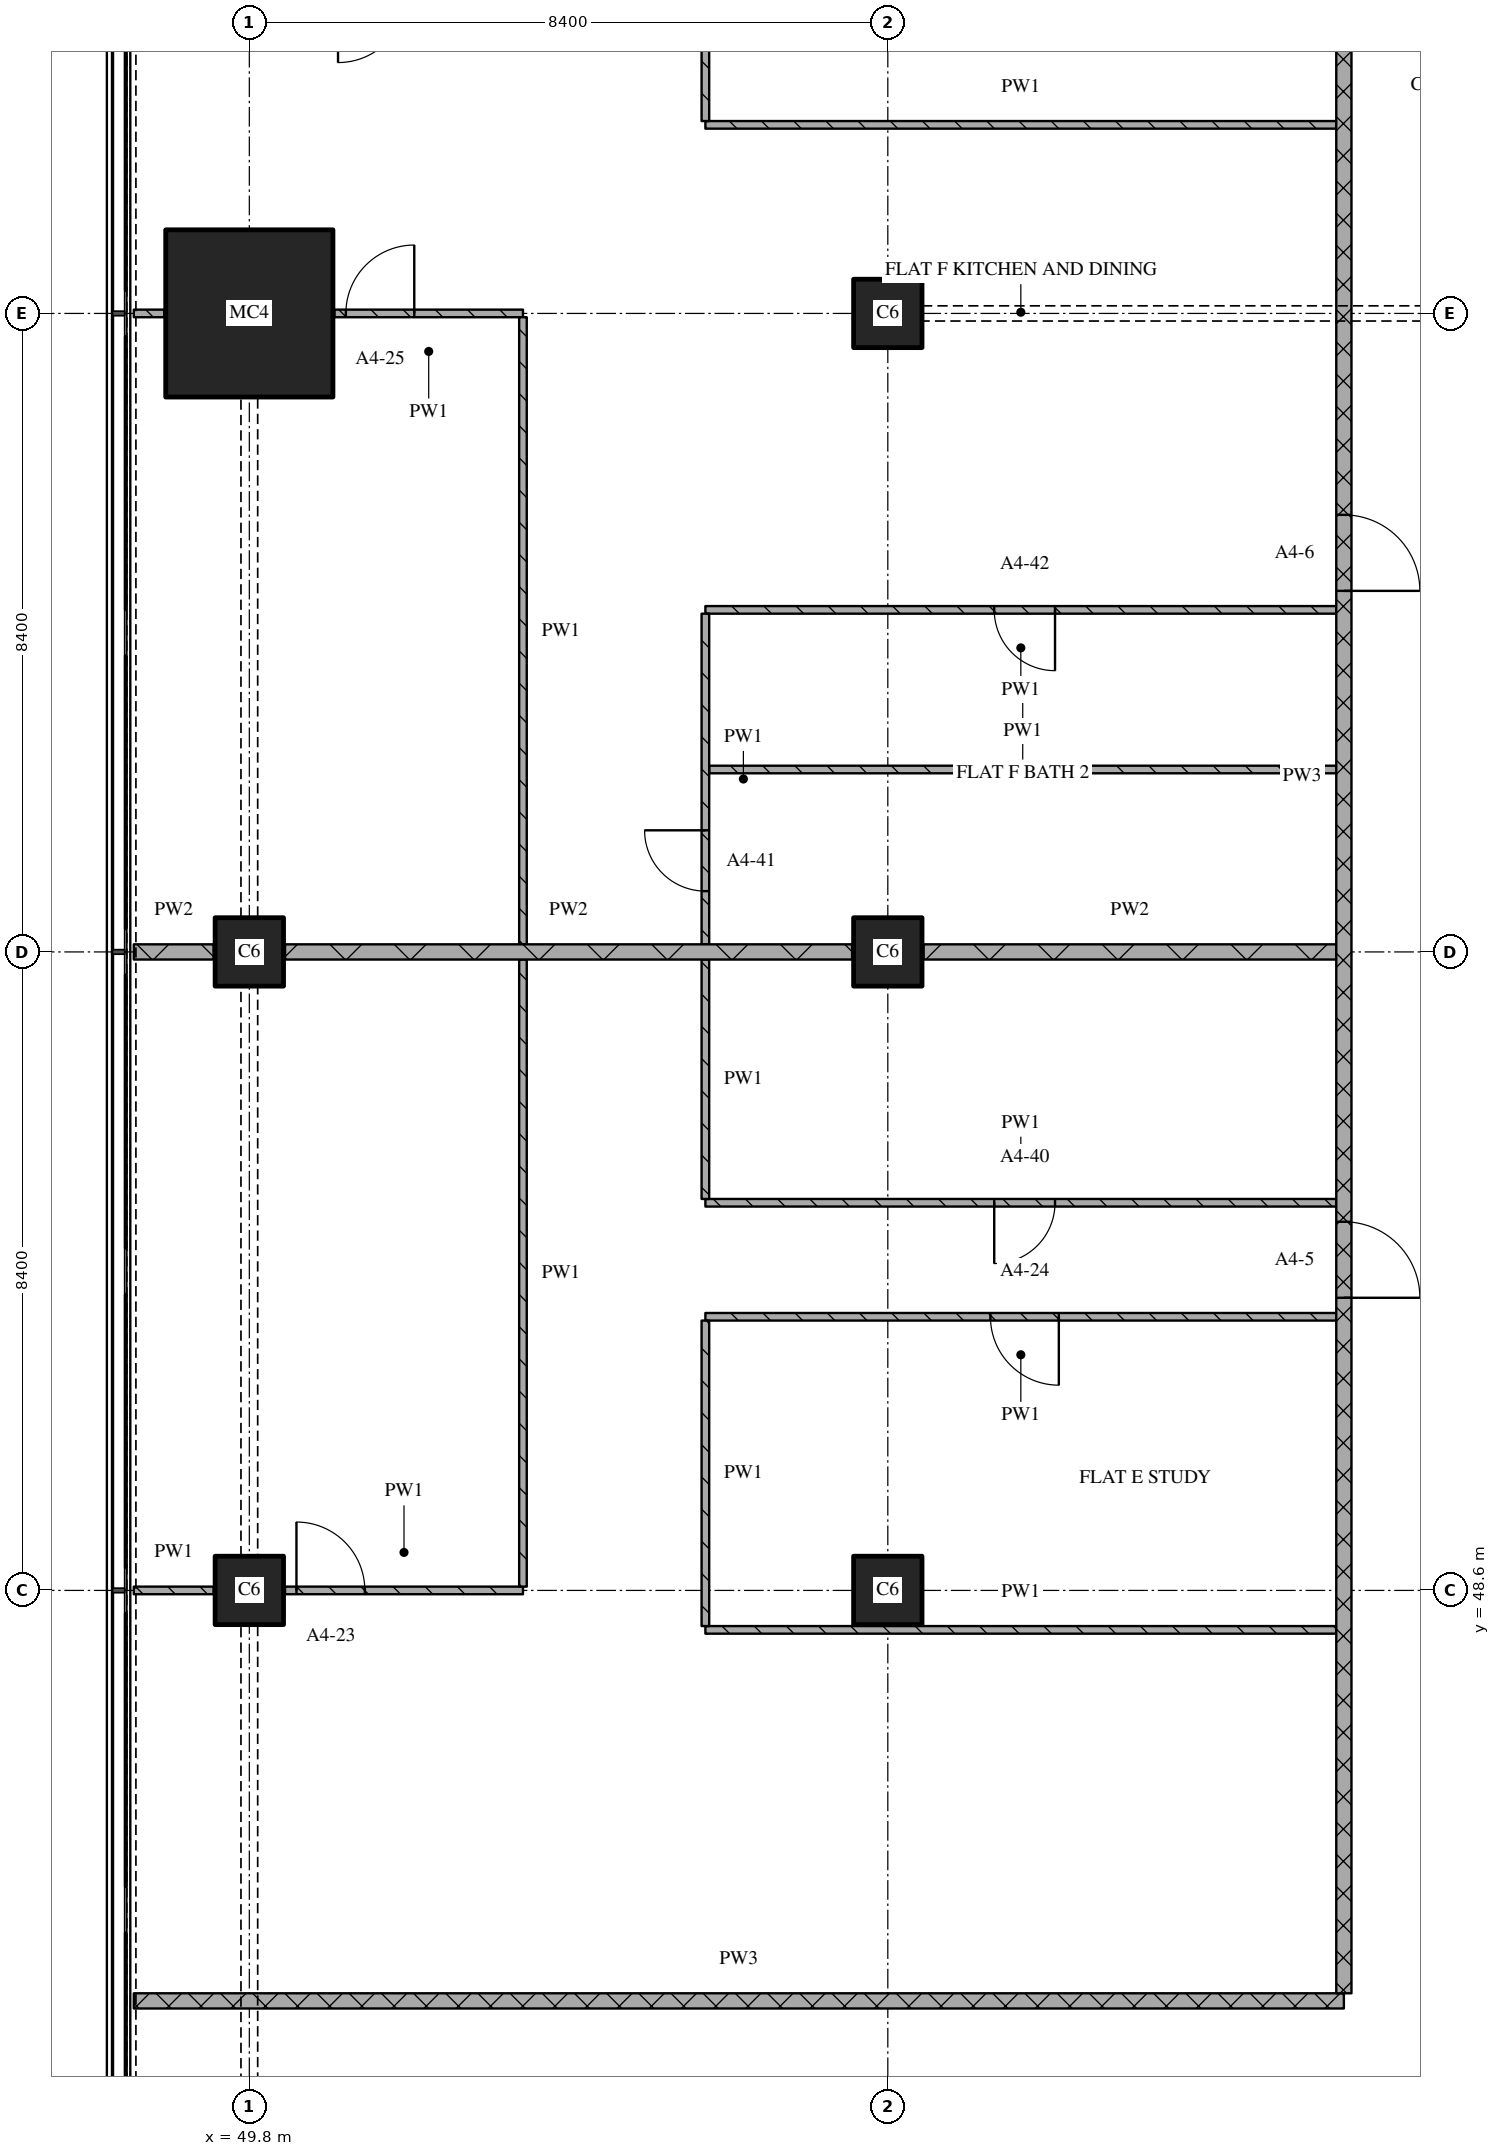
"""IFC4 building model, lengths in metres.
Left out: names, types, materials, properties, quantities, classifications, styles, units other than length and angle.
Written with IfcOpenShell. Run it as: python <this file> out.ifc"""

import sys

from ifc_helpers import new_model, si_unit, direction, frame, frame_2d, origin, origin_2d, place, context, subcontext, project, spatial, rectangle, extrude, element, fill, save


model = new_model("IFC4")
c1 = context("Model", 3, precision=1e-05, world=origin(), true_north=direction((0.0, 1.0)))
c2 = subcontext(c1, "Body", "Model", "MODEL_VIEW")
j1 = project(units=[si_unit("LENGTHUNIT", "METRE"), si_unit("PLANEANGLEUNIT", "RADIAN")], contexts=[c1])
p1 = place(None, origin())
s1 = spatial("IfcSite", under=j1, at=p1, CompositionType="ELEMENT")
p2 = place(p1, origin())
s2 = spatial("IfcBuilding", under=s1, at=p2, CompositionType="ELEMENT")
p3 = place(p2, frame((0.0, 0.0, 69.6)))
s3 = spatial("IfcBuildingStorey", under=s2, at=p3, CompositionType="ELEMENT", Elevation=69.6)
for number, where, z_axis, x_axis in (
    (1, (49.8, 48.6, 0.0), (0.0, 0.0, 1.0), (1.0, 0.0, 0.0)),
    (2, (49.8, 57.0, 0.0), (0.0, 0.0, 1.0), (1.0, 0.0, 0.0)),
):
    element("IfcColumn", number, at=place(p3, frame(where, z_axis=z_axis, x_axis=x_axis)), inside=s3, PredefinedType="COLUMN", context=c2, shape_type="SweptSolid", body=[
        extrude(rectangle(XDim=0.9, YDim=0.9, at=origin_2d()), origin(), (0.0, 0.0, 1.0), 3.6),
    ])
p4 = place(p3, frame((49.8, 65.4, 0.0), z_axis=(0.0, 0.0, 1.0), x_axis=(1.0, 0.0, 0.0)))
e3 = element("IfcColumn", 3, at=p4, inside=s3, PredefinedType="COLUMN", context=c2, shape_type="SweptSolid", body=[
    extrude(rectangle(XDim=2.2, YDim=2.2, at=origin_2d()), origin(), (0.0, 0.0, 1.0), 3.6),
])
for number, where, z_axis, x_axis in (
    (4, (58.2, 48.6, 0.0), (0.0, 0.0, 1.0), (1.0, 0.0, 0.0)),
    (5, (58.2, 57.0, 0.0), (0.0, 0.0, 1.0), (1.0, 0.0, 0.0)),
    (6, (58.2, 65.4, 0.0), (0.0, 0.0, 1.0), (1.0, 0.0, 0.0)),
):
    element("IfcColumn", number, at=place(p3, frame(where, z_axis=z_axis, x_axis=x_axis)), inside=s3, PredefinedType="COLUMN", context=c2, shape_type="SweptSolid", body=[
        extrude(rectangle(XDim=0.9, YDim=0.9, at=origin_2d()), origin(), (0.0, 0.0, 1.0), 3.6),
    ])
p5 = place(p3, frame((48.28, 43.2, 0.0), z_axis=(0.0, 0.0, 1.0), x_axis=(1.0, 0.0, 0.0)))
e7 = element("IfcWall", 7, at=p5, inside=s3, PredefinedType="PARTITIONING", context=c2, shape_type="SweptSolid", body=[
    extrude(rectangle(XDim=15.92, YDim=0.2, at=frame_2d((7.96, 0.0))), origin(), (0.0, 0.0, 1.0), 3.32),
])
p6 = place(p3, frame((55.8, 48.081, 0.0), z_axis=(0.0, 0.0, 1.0), x_axis=(1.0, 0.0, 0.0)))
e8 = element("IfcWall", 8, at=p6, inside=s3, PredefinedType="PARTITIONING", context=c2, shape_type="SweptSolid", body=[
    extrude(rectangle(XDim=8.3, YDim=0.1, at=frame_2d((4.15, 0.0))), origin(), (0.0, 0.0, 1.0), 3.32),
])
p7 = place(p3, frame((48.28, 48.6, 0.0), z_axis=(0.0, 0.0, 1.0), x_axis=(1.0, 0.0, 0.0)))
e9 = element("IfcWall", 9, at=p7, inside=s3, PredefinedType="PARTITIONING", context=c2, shape_type="SweptSolid", body=[
    extrude(rectangle(XDim=1.05, YDim=0.1, at=frame_2d((0.525, 0.0))), origin(), (0.0, 0.0, 1.0), 3.32),
])
p8 = place(p3, frame((50.27, 48.6, 0.0), z_axis=(0.0, 0.0, 1.0), x_axis=(1.0, 0.0, 0.0)))
e10 = element("IfcWall", 10, at=p8, inside=s3, PredefinedType="PARTITIONING", context=c2, shape_type="SweptSolid", body=[
    extrude(rectangle(XDim=3.13, YDim=0.1, at=frame_2d((1.565, 0.0))), origin(), (0.0, 0.0, 1.0), 3.32),
])
p9 = place(p8, frame((0.15, 0.0, 0.0)))
e11 = element("IfcOpeningElement", 11, at=p9, cuts=e10, PredefinedType="OPENING", context=c2, shape_type="SweptSolid", body=[
    extrude(rectangle(XDim=0.9, YDim=2.1, at=frame_2d((0.45, 1.05))), frame((0.0, 0.06, 0.0), z_axis=(0.0, -1.0, 0.0), x_axis=(1.0, 0.0, 0.0)), (0.0, 0.0, 1.0), 0.12),
])
p10 = place(p3, frame((64.1, 52.2, 0.0), z_axis=(0.0, 0.0, 1.0), x_axis=(-1.0, 0.0, 0.0)))
e12 = element("IfcWall", 12, at=p10, inside=s3, PredefinedType="PARTITIONING", context=c2, shape_type="SweptSolid", body=[
    extrude(rectangle(XDim=8.3, YDim=0.1, at=frame_2d((4.15, 0.0))), origin(), (0.0, 0.0, 1.0), 3.32),
])
p11 = place(p10, frame((3.65, 0.0, 0.0)))
e13 = element("IfcOpeningElement", 13, at=p11, cuts=e12, PredefinedType="OPENING", context=c2, shape_type="SweptSolid", body=[
    extrude(rectangle(XDim=0.9, YDim=2.1, at=frame_2d((0.45, 1.05))), frame((0.0, 0.06, 0.0), z_axis=(0.0, -1.0, 0.0), x_axis=(1.0, 0.0, 0.0)), (0.0, 0.0, 1.0), 0.12),
])
p12 = place(p3, frame((55.8, 53.7, 0.0), z_axis=(0.0, 0.0, 1.0), x_axis=(1.0, 0.0, 0.0)))
e14 = element("IfcWall", 14, at=p12, inside=s3, PredefinedType="PARTITIONING", context=c2, shape_type="SweptSolid", body=[
    extrude(rectangle(XDim=8.3, YDim=0.1, at=frame_2d((4.15, 0.0))), origin(), (0.0, 0.0, 1.0), 3.32),
])
p13 = place(p12, frame((3.8, 0.0, 0.0)))
e15 = element("IfcOpeningElement", 15, at=p13, cuts=e14, PredefinedType="OPENING", context=c2, shape_type="SweptSolid", body=[
    extrude(rectangle(XDim=0.8, YDim=2.1, at=frame_2d((0.4, 1.05))), frame((0.0, 0.06, 0.0), z_axis=(0.0, -1.0, 0.0), x_axis=(1.0, 0.0, 0.0)), (0.0, 0.0, 1.0), 0.12),
])
p14 = place(p3, frame((48.28, 57.0, 0.0), z_axis=(0.0, 0.0, 1.0), x_axis=(1.0, 0.0, 0.0)))
e16 = element("IfcWall", 16, at=p14, inside=s3, PredefinedType="PARTITIONING", context=c2, shape_type="SweptSolid", body=[
    extrude(rectangle(XDim=1.05, YDim=0.2, at=frame_2d((0.525, 0.0))), origin(), (0.0, 0.0, 1.0), 3.32),
])
p15 = place(p3, frame((50.27, 57.0, 0.0), z_axis=(0.0, 0.0, 1.0), x_axis=(1.0, 0.0, 0.0)))
e17 = element("IfcWall", 17, at=p15, inside=s3, PredefinedType="PARTITIONING", context=c2, shape_type="SweptSolid", body=[
    extrude(rectangle(XDim=7.46, YDim=0.2, at=frame_2d((3.73, 0.0))), origin(), (0.0, 0.0, 1.0), 3.32),
])
p16 = place(p3, frame((58.67, 57.0, 0.0), z_axis=(0.0, 0.0, 1.0), x_axis=(1.0, 0.0, 0.0)))
e18 = element("IfcWall", 18, at=p16, inside=s3, PredefinedType="PARTITIONING", context=c2, shape_type="SweptSolid", body=[
    extrude(rectangle(XDim=5.43, YDim=0.2, at=frame_2d((2.715, 0.0))), origin(), (0.0, 0.0, 1.0), 3.32),
])
p17 = place(p3, frame((55.85, 59.4, 0.0), z_axis=(0.0, 0.0, 1.0), x_axis=(1.0, 0.0, 0.0)))
e19 = element("IfcWall", 19, at=p17, inside=s3, PredefinedType="PARTITIONING", context=c2, shape_type="SweptSolid", body=[
    extrude(rectangle(XDim=8.25, YDim=0.1, at=frame_2d((4.125, 0.0))), origin(), (0.0, 0.0, 1.0), 3.32),
])
p18 = place(p3, frame((64.1, 61.5, 0.0), z_axis=(0.0, 0.0, 1.0), x_axis=(-1.0, 0.0, 0.0)))
e20 = element("IfcWall", 20, at=p18, inside=s3, PredefinedType="PARTITIONING", context=c2, shape_type="SweptSolid", body=[
    extrude(rectangle(XDim=8.3, YDim=0.1, at=frame_2d((4.15, 0.0))), origin(), (0.0, 0.0, 1.0), 3.32),
])
p19 = place(p18, frame((3.7, 0.0, 0.0)))
e21 = element("IfcOpeningElement", 21, at=p19, cuts=e20, PredefinedType="OPENING", context=c2, shape_type="SweptSolid", body=[
    extrude(rectangle(XDim=0.8, YDim=2.1, at=frame_2d((0.4, 1.05))), frame((0.0, 0.06, 0.0), z_axis=(0.0, -1.0, 0.0), x_axis=(1.0, 0.0, 0.0)), (0.0, 0.0, 1.0), 0.12),
])
p20 = place(p3, frame((48.28, 65.4, 0.0), z_axis=(0.0, 0.0, 1.0), x_axis=(1.0, 0.0, 0.0)))
e22 = element("IfcWall", 22, at=p20, inside=s3, PredefinedType="PARTITIONING", context=c2, shape_type="SweptSolid", body=[
    extrude(rectangle(XDim=0.4, YDim=0.1, at=frame_2d((0.2, 0.0))), origin(), (0.0, 0.0, 1.0), 3.32),
])
p21 = place(p3, frame((53.4, 65.4, 0.0), z_axis=(0.0, 0.0, 1.0), x_axis=(-1.0, 0.0, 0.0)))
e23 = element("IfcWall", 23, at=p21, inside=s3, PredefinedType="PARTITIONING", context=c2, shape_type="SweptSolid", body=[
    extrude(rectangle(XDim=2.48, YDim=0.1, at=frame_2d((1.24, 0.0))), origin(), (0.0, 0.0, 1.0), 3.32),
])
p22 = place(p21, frame((1.43, 0.0, 0.0)))
e24 = element("IfcOpeningElement", 24, at=p22, cuts=e23, PredefinedType="OPENING", context=c2, shape_type="SweptSolid", body=[
    extrude(rectangle(XDim=0.9, YDim=2.1, at=frame_2d((0.45, 1.05))), frame((0.0, 0.06, 0.0), z_axis=(0.0, -1.0, 0.0), x_axis=(1.0, 0.0, 0.0)), (0.0, 0.0, 1.0), 0.12),
])
p23 = place(p3, frame((55.8, 67.881, 0.0), z_axis=(0.0, 0.0, 1.0), x_axis=(1.0, 0.0, 0.0)))
e25 = element("IfcWall", 25, at=p23, inside=s3, PredefinedType="PARTITIONING", context=c2, shape_type="SweptSolid", body=[
    extrude(rectangle(XDim=8.3, YDim=0.1, at=frame_2d((4.15, 0.0))), origin(), (0.0, 0.0, 1.0), 3.32),
])
p24 = place(p3, frame((55.8, 52.15, 0.0), z_axis=(0.0, 0.0, 1.0), x_axis=(0.0, -1.0, 0.0)))
e26 = element("IfcWall", 26, at=p24, inside=s3, PredefinedType="PARTITIONING", context=c2, shape_type="SweptSolid", body=[
    extrude(rectangle(XDim=4.019, YDim=0.1, at=frame_2d((2.009, 0.0))), origin(), (0.0, 0.0, 1.0), 3.32),
])
p25 = place(p3, frame((55.8, 75.32, 0.0), z_axis=(0.0, 0.0, 1.0), x_axis=(0.0, -1.0, 0.0)))
e27 = element("IfcWall", 27, at=p25, inside=s3, PredefinedType="PARTITIONING", context=c2, shape_type="SweptSolid", body=[
    extrude(rectangle(XDim=7.389, YDim=0.1, at=frame_2d((3.695, 0.0))), origin(), (0.0, 0.0, 1.0), 3.32),
])
p26 = place(p25, frame((3.129, 0.0, 0.0)))
e28 = element("IfcOpeningElement", 28, at=p26, cuts=e27, PredefinedType="OPENING", context=c2, shape_type="SweptSolid", body=[
    extrude(rectangle(XDim=0.9, YDim=2.1, at=frame_2d((0.45, 1.05))), frame((0.0, 0.06, 0.0), z_axis=(0.0, -1.0, 0.0), x_axis=(1.0, 0.0, 0.0)), (0.0, 0.0, 1.0), 0.12),
])
p27 = place(p3, frame((64.2, 43.3, 0.0), z_axis=(0.0, 0.0, 1.0), x_axis=(0.0, 1.0, 0.0)))
e29 = element("IfcWall", 29, at=p27, inside=s3, PredefinedType="PARTITIONING", context=c2, shape_type="SweptSolid", body=[
    extrude(rectangle(XDim=32.02, YDim=0.2, at=frame_2d((16.01, 0.0))), origin(), (0.0, 0.0, 1.0), 3.32),
])
p28 = place(p27, frame((9.15, 0.0, 0.0)))
e30 = element("IfcOpeningElement", 30, at=p28, cuts=e29, PredefinedType="OPENING", context=c2, shape_type="SweptSolid", body=[
    extrude(rectangle(XDim=1.0, YDim=2.1, at=frame_2d((0.5, 1.05))), frame((0.0, 0.11, 0.0), z_axis=(0.0, -1.0, 0.0), x_axis=(1.0, 0.0, 0.0)), (0.0, 0.0, 1.0), 0.22),
])
p29 = place(p27, frame((18.45, 0.0, 0.0)))
e31 = element("IfcOpeningElement", 31, at=p29, cuts=e29, PredefinedType="OPENING", context=c2, shape_type="SweptSolid", body=[
    extrude(rectangle(XDim=1.0, YDim=2.1, at=frame_2d((0.5, 1.05))), frame((0.0, 0.11, 0.0), z_axis=(0.0, -1.0, 0.0), x_axis=(1.0, 0.0, 0.0)), (0.0, 0.0, 1.0), 0.22),
])
for number, where, z_axis, x_axis in (
    (32, (53.4, 56.9, 0.0), (0.0, 0.0, 1.0), (0.0, -1.0, 0.0)),
    (33, (53.4, 65.35, 0.0), (0.0, 0.0, 1.0), (0.0, -1.0, 0.0)),
):
    element("IfcWall", number, at=place(p3, frame(where, z_axis=z_axis, x_axis=x_axis)), inside=s3, PredefinedType="PARTITIONING", context=c2, shape_type="SweptSolid", body=[
        extrude(rectangle(XDim=8.25, YDim=0.1, at=frame_2d((4.125, 0.0))), origin(), (0.0, 0.0, 1.0), 3.32),
    ])
p30 = place(p3, frame((55.8, 56.9, 0.0), z_axis=(0.0, 0.0, 1.0), x_axis=(0.0, -1.0, 0.0)))
e34 = element("IfcWall", 34, at=p30, inside=s3, PredefinedType="PARTITIONING", context=c2, shape_type="SweptSolid", body=[
    extrude(rectangle(XDim=3.15, YDim=0.1, at=frame_2d((1.575, 0.0))), origin(), (0.0, 0.0, 1.0), 3.32),
])
p31 = place(p3, frame((55.8, 61.45, 0.0), z_axis=(0.0, 0.0, 1.0), x_axis=(0.0, -1.0, 0.0)))
e35 = element("IfcWall", 35, at=p31, inside=s3, PredefinedType="PARTITIONING", context=c2, shape_type="SweptSolid", body=[
    extrude(rectangle(XDim=4.35, YDim=0.1, at=frame_2d((2.175, 0.0))), origin(), (0.0, 0.0, 1.0), 3.32),
])
p32 = place(p31, frame((2.85, 0.0, 0.0)))
e36 = element("IfcOpeningElement", 36, at=p32, cuts=e35, PredefinedType="OPENING", context=c2, shape_type="SweptSolid", body=[
    extrude(rectangle(XDim=0.8, YDim=2.1, at=frame_2d((0.4, 1.05))), frame((0.0, 0.06, 0.0), z_axis=(0.0, -1.0, 0.0), x_axis=(1.0, 0.0, 0.0)), (0.0, 0.0, 1.0), 0.12),
])
p33 = place(p9, origin())
e37 = element("IfcDoor", 37, at=p33, inside=s3, OperationType="SINGLE_SWING_LEFT", PredefinedType="DOOR", context=c2, shape_type="SweptSolid", body=[
    extrude(rectangle(XDim=0.9, YDim=2.1, at=frame_2d((0.45, 1.05))), frame((0.0, 0.025, 0.0), z_axis=(0.0, -1.0, 0.0), x_axis=(1.0, 0.0, 0.0)), (0.0, 0.0, 1.0), 0.05),
])
fill(e11, e37)
p34 = place(p11, origin())
e38 = element("IfcDoor", 38, at=p34, inside=s3, OperationType="SINGLE_SWING_LEFT", PredefinedType="DOOR", context=c2, shape_type="SweptSolid", body=[
    extrude(rectangle(XDim=0.9, YDim=2.1, at=frame_2d((0.45, 1.05))), frame((0.0, 0.025, 0.0), z_axis=(0.0, -1.0, 0.0), x_axis=(1.0, 0.0, 0.0)), (0.0, 0.0, 1.0), 0.05),
])
fill(e13, e38)
p35 = place(p13, origin())
e39 = element("IfcDoor", 39, at=p35, inside=s3, OperationType="SINGLE_SWING_RIGHT", PredefinedType="DOOR", context=c2, shape_type="SweptSolid", body=[
    extrude(rectangle(XDim=0.8, YDim=2.1, at=frame_2d((0.4, 1.05))), frame((0.0, 0.025, 0.0), z_axis=(0.0, -1.0, 0.0), x_axis=(1.0, 0.0, 0.0)), (0.0, 0.0, 1.0), 0.05),
])
fill(e15, e39)
p36 = place(p19, origin())
e40 = element("IfcDoor", 40, at=p36, inside=s3, OperationType="SINGLE_SWING_LEFT", PredefinedType="DOOR", context=c2, shape_type="SweptSolid", body=[
    extrude(rectangle(XDim=0.8, YDim=2.1, at=frame_2d((0.4, 1.05))), frame((0.0, 0.025, 0.0), z_axis=(0.0, -1.0, 0.0), x_axis=(1.0, 0.0, 0.0)), (0.0, 0.0, 1.0), 0.05),
])
fill(e21, e40)
p37 = place(p22, origin())
e41 = element("IfcDoor", 41, at=p37, inside=s3, OperationType="SINGLE_SWING_RIGHT", PredefinedType="DOOR", context=c2, shape_type="SweptSolid", body=[
    extrude(rectangle(XDim=0.9, YDim=2.1, at=frame_2d((0.45, 1.05))), frame((0.0, 0.025, 0.0), z_axis=(0.0, -1.0, 0.0), x_axis=(1.0, 0.0, 0.0)), (0.0, 0.0, 1.0), 0.05),
])
fill(e24, e41)
p38 = place(p28, origin())
e42 = element("IfcDoor", 42, at=p38, inside=s3, OperationType="SINGLE_SWING_RIGHT", PredefinedType="DOOR", context=c2, shape_type="SweptSolid", body=[
    extrude(rectangle(XDim=1.0, YDim=2.1, at=frame_2d((0.5, 1.05))), frame((0.0, 0.025, 0.0), z_axis=(0.0, -1.0, 0.0), x_axis=(1.0, 0.0, 0.0)), (0.0, 0.0, 1.0), 0.05),
])
fill(e30, e42)
p39 = place(p29, origin())
e43 = element("IfcDoor", 43, at=p39, inside=s3, OperationType="SINGLE_SWING_RIGHT", PredefinedType="DOOR", context=c2, shape_type="SweptSolid", body=[
    extrude(rectangle(XDim=1.0, YDim=2.1, at=frame_2d((0.5, 1.05))), frame((0.0, 0.025, 0.0), z_axis=(0.0, -1.0, 0.0), x_axis=(1.0, 0.0, 0.0)), (0.0, 0.0, 1.0), 0.05),
])
fill(e31, e43)
p40 = place(p32, origin())
e44 = element("IfcDoor", 44, at=p40, inside=s3, OperationType="SINGLE_SWING_RIGHT", PredefinedType="DOOR", context=c2, shape_type="SweptSolid", body=[
    extrude(rectangle(XDim=0.8, YDim=2.1, at=frame_2d((0.4, 1.05))), frame((0.0, 0.025, 0.0), z_axis=(0.0, -1.0, 0.0), x_axis=(1.0, 0.0, 0.0)), (0.0, 0.0, 1.0), 0.05),
])
fill(e36, e44)
save(model, sys.argv[1])
